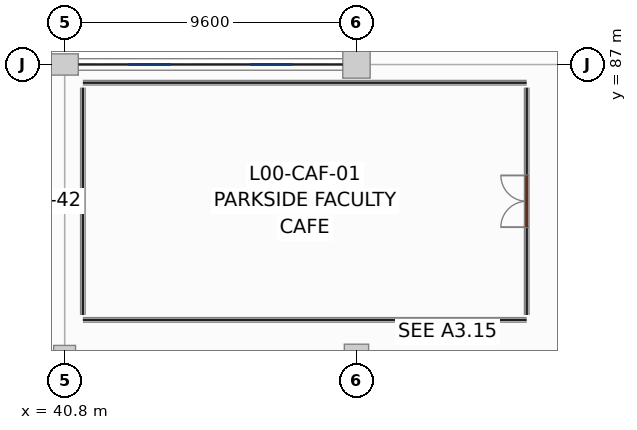
"""IFC4 building model, lengths in metres.
Left out: names, types, materials, properties, quantities, classifications, styles, units other than length and angle.
Written with IfcOpenShell. Run it as: python <this file> out.ifc"""

import sys

from ifc_helpers import new_model, si_unit, direction, frame, frame_2d, origin, origin_2d, place, context, subcontext, project, spatial, rectangle, extrude, element, fill, save


model = new_model("IFC4")
c1 = context("Model", 3, precision=1e-05, world=origin(), true_north=direction((0.0, 1.0)))
c2 = subcontext(c1, "Body", "Model", "MODEL_VIEW")
j1 = project(units=[si_unit("LENGTHUNIT", "METRE"), si_unit("PLANEANGLEUNIT", "RADIAN")], contexts=[c1])
p1 = place(None, origin())
s1 = spatial("IfcSite", under=j1, at=p1, CompositionType="ELEMENT")
p2 = place(p1, origin())
s2 = spatial("IfcBuilding", under=s1, at=p2, CompositionType="ELEMENT")
p3 = place(p2, origin())
s3 = spatial("IfcBuildingStorey", under=s2, at=p3, CompositionType="ELEMENT", Elevation=0.0)
p4 = place(p3, frame((40.8, 77.4, 0.0), z_axis=(0.0, 0.0, 1.0), x_axis=(1.0, 0.0, 0.0)))
e1 = element("IfcColumn", 1, at=p4, inside=s3, PredefinedType="COLUMN", context=c2, shape_type="SweptSolid", body=[
    extrude(rectangle(XDim=0.72, YDim=0.72, at=origin_2d()), origin(), (0.0, 0.0, 1.0), 5.08),
])
p5 = place(p3, frame((40.8, 87.0, 0.0), z_axis=(0.0, 0.0, 1.0), x_axis=(1.0, 0.0, 0.0)))
e2 = element("IfcColumn", 2, at=p5, inside=s3, PredefinedType="COLUMN", context=c2, shape_type="SweptSolid", body=[
    extrude(rectangle(XDim=0.9, YDim=0.7, at=origin_2d()), origin(), (0.0, 0.0, 1.0), 5.08),
])
p6 = place(p3, frame((50.4, 77.4, 0.0), z_axis=(0.0, 0.0, 1.0), x_axis=(1.0, 0.0, 0.0)))
e3 = element("IfcColumn", 3, at=p6, inside=s3, PredefinedType="COLUMN", context=c2, shape_type="SweptSolid", body=[
    extrude(rectangle(XDim=0.8, YDim=0.8, at=origin_2d()), origin(), (0.0, 0.0, 1.0), 5.08),
])
p7 = place(p3, frame((50.4, 87.0, 0.0), z_axis=(0.0, 0.0, 1.0), x_axis=(1.0, 0.0, 0.0)))
e4 = element("IfcColumn", 4, at=p7, inside=s3, PredefinedType="COLUMN", context=c2, shape_type="SweptSolid", body=[
    extrude(rectangle(XDim=0.9, YDim=0.9, at=origin_2d()), origin(), (0.0, 0.0, 1.0), 5.08),
])
p8 = place(p3, frame((41.252, 87.0, 0.0), z_axis=(0.0, 0.0, 1.0), x_axis=(1.0, 0.0, 0.0)))
e5 = element("IfcWall", 5, at=p8, inside=s3, PredefinedType="SOLIDWALL", context=c2, shape_type="SweptSolid", body=[
    extrude(rectangle(XDim=8.696, YDim=0.38, at=frame_2d((4.348, 0.0))), origin(), (0.0, 0.0, 1.0), 4.28),
])
p9 = place(p8, frame((1.648, 0.0, 0.85)))
e6 = element("IfcOpeningElement", 6, at=p9, cuts=e5, PredefinedType="OPENING", context=c2, shape_type="SweptSolid", body=[
    extrude(rectangle(XDim=1.4, YDim=1.65, at=frame_2d((0.7, 0.825))), frame((0.0, 0.2, 0.0), z_axis=(0.0, -1.0, 0.0), x_axis=(1.0, 0.0, 0.0)), (0.0, 0.0, 1.0), 0.4),
])
p10 = place(p8, frame((5.648, 0.0, 0.85)))
e7 = element("IfcOpeningElement", 7, at=p10, cuts=e5, PredefinedType="OPENING", context=c2, shape_type="SweptSolid", body=[
    extrude(rectangle(XDim=1.4, YDim=1.65, at=frame_2d((0.7, 0.825))), frame((0.0, 0.2, 0.0), z_axis=(0.0, -1.0, 0.0), x_axis=(1.0, 0.0, 0.0)), (0.0, 0.0, 1.0), 0.4),
])
for number, where, z_axis, x_axis in (
    (8, (41.4, 78.6, 0.0), (0.0, 0.0, 1.0), (1.0, 0.0, 0.0)),
    (9, (41.4, 86.4, 0.0), (0.0, 0.0, 1.0), (1.0, 0.0, 0.0)),
):
    element("IfcWall", number, at=place(p3, frame(where, z_axis=z_axis, x_axis=x_axis)), inside=s3, PredefinedType="PARTITIONING", context=c2, shape_type="SweptSolid", body=[
        extrude(rectangle(XDim=14.6, YDim=0.15, at=frame_2d((7.3, 0.0))), origin(), (0.0, 0.0, 1.0), 4.12),
    ])
p11 = place(p3, frame((41.4, 78.76, 0.0), z_axis=(0.0, 0.0, 1.0), x_axis=(0.0, 1.0, 0.0)))
e10 = element("IfcWall", 10, at=p11, inside=s3, PredefinedType="PARTITIONING", context=c2, shape_type="SweptSolid", body=[
    extrude(rectangle(XDim=7.48, YDim=0.15, at=frame_2d((3.74, 0.0))), origin(), (0.0, 0.0, 1.0), 4.12),
])
p12 = place(p3, frame((56.0, 78.76, 0.0), z_axis=(0.0, 0.0, 1.0), x_axis=(0.0, 1.0, 0.0)))
e11 = element("IfcWall", 11, at=p12, inside=s3, PredefinedType="PARTITIONING", context=c2, shape_type="SweptSolid", body=[
    extrude(rectangle(XDim=7.48, YDim=0.15, at=frame_2d((3.74, 0.0))), origin(), (0.0, 0.0, 1.0), 4.12),
])
p13 = place(p12, frame((2.89, 0.0, 0.0)))
e12 = element("IfcOpeningElement", 12, at=p13, cuts=e11, PredefinedType="OPENING", context=c2, shape_type="SweptSolid", body=[
    extrude(rectangle(XDim=1.7, YDim=2.3, at=frame_2d((0.85, 1.15))), frame((0.0, 0.085, 0.0), z_axis=(0.0, -1.0, 0.0), x_axis=(1.0, 0.0, 0.0)), (0.0, 0.0, 1.0), 0.17),
])
p14 = place(p9, origin())
e13 = element("IfcWindow", 13, at=p14, inside=s3, PartitioningType="SINGLE_PANEL", PredefinedType="WINDOW", context=c2, shape_type="SweptSolid", body=[
    extrude(rectangle(XDim=1.4, YDim=1.65, at=frame_2d((0.7, 0.825))), frame((0.0, 0.03, 0.0), z_axis=(0.0, -1.0, 0.0), x_axis=(1.0, 0.0, 0.0)), (0.0, 0.0, 1.0), 0.06),
])
fill(e6, e13)
p15 = place(p10, origin())
e14 = element("IfcWindow", 14, at=p15, inside=s3, PartitioningType="SINGLE_PANEL", PredefinedType="WINDOW", context=c2, shape_type="SweptSolid", body=[
    extrude(rectangle(XDim=1.4, YDim=1.65, at=frame_2d((0.7, 0.825))), frame((0.0, 0.03, 0.0), z_axis=(0.0, -1.0, 0.0), x_axis=(1.0, 0.0, 0.0)), (0.0, 0.0, 1.0), 0.06),
])
fill(e7, e14)
p16 = place(p13, origin())
e15 = element("IfcDoor", 15, at=p16, inside=s3, OperationType="DOUBLE_DOOR_SINGLE_SWING", PredefinedType="DOOR", context=c2, shape_type="SweptSolid", body=[
    extrude(rectangle(XDim=1.7, YDim=2.3, at=frame_2d((0.85, 1.15))), frame((0.0, 0.025, 0.0), z_axis=(0.0, -1.0, 0.0), x_axis=(1.0, 0.0, 0.0)), (0.0, 0.0, 1.0), 0.05),
])
fill(e12, e15)
save(model, sys.argv[1])
